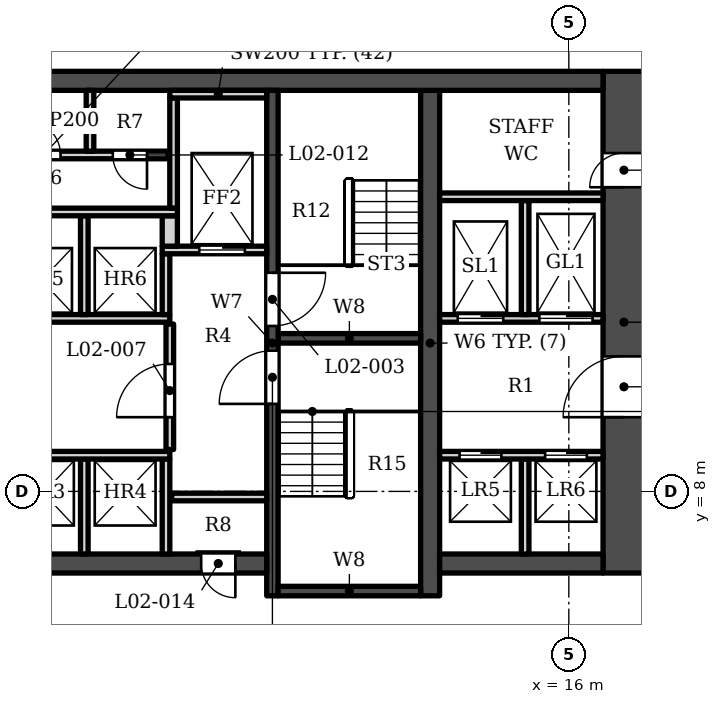
"""IFC4 building model, lengths in metres.
Left out: names, types, materials, properties, quantities, classifications, styles, units other than length and angle.
Written with IfcOpenShell. Run it as: python <this file> out.ifc"""

import sys

from ifc_helpers import new_model, si_unit, direction, frame, frame_2d, origin, place, context, subcontext, project, spatial, rectangle, extrude, element, fill, save


model = new_model("IFC4")
c1 = context("Model", 3, precision=1e-05, world=origin(), true_north=direction((0.0, 1.0)))
c2 = subcontext(c1, "Body", "Model", "MODEL_VIEW")
j1 = project(units=[si_unit("LENGTHUNIT", "METRE"), si_unit("PLANEANGLEUNIT", "RADIAN")], contexts=[c1])
p1 = place(None, origin())
s1 = spatial("IfcSite", under=j1, at=p1, CompositionType="ELEMENT")
p2 = place(p1, origin())
s2 = spatial("IfcBuilding", under=s1, at=p2, CompositionType="ELEMENT")
p3 = place(p2, frame((0.0, 0.0, 20.0)))
s3 = spatial("IfcBuildingStorey", under=s2, at=p3, CompositionType="ELEMENT", Elevation=20.0)
p4 = place(p3, frame((-16.9, 18.802, 0.0), z_axis=(0.0, 0.0, 1.0), x_axis=(1.0, 0.0, 0.0)))
e1 = element("IfcWall", 1, at=p4, inside=s3, PredefinedType="SHEAR", context=c2, shape_type="SweptSolid", body=[
    extrude(rectangle(XDim=33.8, YDim=0.5, at=frame_2d((16.9, 0.0))), origin(), (0.0, 0.0, 1.0), 9.0),
])
p5 = place(p3, frame((12.35, 5.253, 0.0), z_axis=(0.0, 0.0, 1.0), x_axis=(0.0, 1.0, 0.0)))
e2 = element("IfcWall", 2, at=p5, inside=s3, PredefinedType="SHEAR", context=c2, shape_type="SweptSolid", body=[
    extrude(rectangle(XDim=13.3, YDim=0.5, at=frame_2d((6.65, 0.0))), origin(), (0.0, 0.0, 1.0), 9.0),
])
p6 = place(p3, frame((8.2, 5.253, 0.0), z_axis=(0.0, 0.0, 1.0), x_axis=(0.0, 1.0, 0.0)))
e3 = element("IfcWall", 3, at=p6, inside=s3, PredefinedType="SHEAR", context=c2, shape_type="SweptSolid", body=[
    extrude(rectangle(XDim=13.3, YDim=0.3, at=frame_2d((6.65, 0.0))), origin(), (0.0, 0.0, 1.0), 9.0),
])
p7 = place(p6, frame((7.1, 0.0, 0.0)))
e4 = element("IfcOpeningElement", 4, at=p7, cuts=e3, PredefinedType="OPENING", context=c2, shape_type="SweptSolid", body=[
    extrude(rectangle(XDim=1.4, YDim=2.1, at=frame_2d((0.7, 1.05))), frame((0.0, 0.16, 0.0), z_axis=(0.0, -1.0, 0.0), x_axis=(1.0, 0.0, 0.0)), (0.0, 0.0, 1.0), 0.32),
])
p8 = place(p6, frame((5.05, 0.0, 0.0)))
e5 = element("IfcOpeningElement", 5, at=p8, cuts=e3, PredefinedType="OPENING", context=c2, shape_type="SweptSolid", body=[
    extrude(rectangle(XDim=1.4, YDim=2.1, at=frame_2d((0.7, 1.05))), frame((0.0, 0.16, 0.0), z_axis=(0.0, -1.0, 0.0), x_axis=(1.0, 0.0, 0.0)), (0.0, 0.0, 1.0), 0.32),
])
for number, where, z_axis, x_axis in (
    (6, (8.35, 12.028, 0.0), (0.0, 0.0, 1.0), (1.0, 0.0, 0.0)),
    (7, (8.35, 5.378, 0.0), (0.0, 0.0, 1.0), (1.0, 0.0, 0.0)),
):
    element("IfcWall", number, at=place(p3, frame(where, z_axis=z_axis, x_axis=x_axis)), inside=s3, PredefinedType="SHEAR", context=c2, shape_type="SweptSolid", body=[
        extrude(rectangle(XDim=3.75, YDim=0.25, at=frame_2d((1.875, 0.0))), origin(), (0.0, 0.0, 1.0), 9.0),
    ])
p9 = place(p3, frame((1.0, 6.103, 0.0), z_axis=(0.0, 0.0, 1.0), x_axis=(1.0, 0.0, 0.0)))
e8 = element("IfcWall", 8, at=p9, inside=s3, PredefinedType="SHEAR", context=c2, shape_type="SweptSolid", body=[
    extrude(rectangle(XDim=7.05, YDim=0.5, at=frame_2d((3.525, 0.0))), origin(), (0.0, 0.0, 1.0), 9.0),
])
p10 = place(p9, frame((5.325, 0.0, 0.0)))
e9 = element("IfcOpeningElement", 9, at=p10, cuts=e8, PredefinedType="OPENING", context=c2, shape_type="SweptSolid", body=[
    extrude(rectangle(XDim=0.9, YDim=2.1, at=frame_2d((0.45, 1.05))), frame((0.0, 0.26, 0.0), z_axis=(0.0, -1.0, 0.0), x_axis=(1.0, 0.0, 0.0)), (0.0, 0.0, 1.0), 0.52),
])
p11 = place(p3, frame((12.6, 6.103, 0.0), z_axis=(0.0, 0.0, 1.0), x_axis=(1.0, 0.0, 0.0)))
e10 = element("IfcWall", 10, at=p11, inside=s3, PredefinedType="SHEAR", context=c2, shape_type="SweptSolid", body=[
    extrude(rectangle(XDim=4.3, YDim=0.5, at=frame_2d((2.15, 0.0))), origin(), (0.0, 0.0, 1.0), 9.0),
])
p12 = place(p3, frame((17.45, 5.853, 0.0), z_axis=(0.0, 0.0, 1.0), x_axis=(0.0, 1.0, 0.0)))
e11 = element("IfcWall", 11, at=p12, inside=s3, PredefinedType="SHEAR", context=c2, shape_type="SweptSolid", body=[
    extrude(rectangle(XDim=13.2, YDim=1.1, at=frame_2d((6.6, 0.0))), origin(), (0.0, 0.0, 1.0), 9.0),
])
p13 = place(p12, frame((4.1, 0.0, 0.0)))
e12 = element("IfcOpeningElement", 12, at=p13, cuts=e11, PredefinedType="OPENING", context=c2, shape_type="SweptSolid", body=[
    extrude(rectangle(XDim=1.6, YDim=2.1, at=frame_2d((0.8, 1.05))), frame((0.0, 0.56, 0.0), z_axis=(0.0, -1.0, 0.0), x_axis=(1.0, 0.0, 0.0)), (0.0, 0.0, 1.0), 1.12),
])
p14 = place(p12, frame((10.15, 0.0, 0.0)))
e13 = element("IfcOpeningElement", 13, at=p14, cuts=e11, PredefinedType="OPENING", context=c2, shape_type="SweptSolid", body=[
    extrude(rectangle(XDim=0.9, YDim=2.1, at=frame_2d((0.45, 1.05))), frame((0.0, 0.56, 0.0), z_axis=(0.0, -1.0, 0.0), x_axis=(1.0, 0.0, 0.0)), (0.0, 0.0, 1.0), 1.12),
])
for number, where, z_axis, x_axis in (
    (14, (3.25, 6.353, 0.0), (0.0, 0.0, 1.0), (0.0, 1.0, 0.0)),
    (15, (5.4, 6.353, 0.0), (0.0, 0.0, 1.0), (0.0, 1.0, 0.0)),
    (16, (14.85, 6.353, 0.0), (0.0, 0.0, 1.0), (0.0, 1.0, 0.0)),
    (17, (5.55, 7.853, 0.0), (0.0, 0.0, 1.0), (1.0, 0.0, 0.0)),
):
    element("IfcWall", number, at=place(p3, frame(where, z_axis=z_axis, x_axis=x_axis)), inside=s3, PredefinedType="SOLIDWALL", context=c2, shape_type="SweptSolid", body=[
        extrude(rectangle(XDim=2.5, YDim=0.2, at=frame_2d((1.25, 0.0))), origin(), (0.0, 0.0, 1.0), 8.55),
    ])
p15 = place(p3, frame((1.0, 8.953, 0.0), z_axis=(0.0, 0.0, 1.0), x_axis=(1.0, 0.0, 0.0)))
e18 = element("IfcWall", 18, at=p15, inside=s3, PredefinedType="SOLIDWALL", context=c2, shape_type="SweptSolid", body=[
    extrude(rectangle(XDim=4.5, YDim=0.2, at=frame_2d((2.25, 0.0))), origin(), (0.0, 0.0, 1.0), 8.55),
])
p16 = place(p3, frame((12.6, 8.953, 0.0), z_axis=(0.0, 0.0, 1.0), x_axis=(1.0, 0.0, 0.0)))
e19 = element("IfcWall", 19, at=p16, inside=s3, PredefinedType="SOLIDWALL", context=c2, shape_type="SweptSolid", body=[
    extrude(rectangle(XDim=4.3, YDim=0.2, at=frame_2d((2.15, 0.0))), origin(), (0.0, 0.0, 1.0), 8.55),
])
p17 = place(p16, frame((0.525, 0.0, 0.0)))
e20 = element("IfcOpeningElement", 20, at=p17, cuts=e19, PredefinedType="OPENING", context=c2, shape_type="SweptSolid", body=[
    extrude(rectangle(XDim=1.1, YDim=2.1, at=frame_2d((0.55, 1.05))), frame((0.0, 0.11, 0.0), z_axis=(0.0, -1.0, 0.0), x_axis=(1.0, 0.0, 0.0)), (0.0, 0.0, 1.0), 0.22),
])
p18 = place(p16, frame((2.775, 0.0, 0.0)))
e21 = element("IfcOpeningElement", 21, at=p18, cuts=e19, PredefinedType="OPENING", context=c2, shape_type="SweptSolid", body=[
    extrude(rectangle(XDim=1.1, YDim=2.1, at=frame_2d((0.55, 1.05))), frame((0.0, 0.11, 0.0), z_axis=(0.0, -1.0, 0.0), x_axis=(1.0, 0.0, 0.0)), (0.0, 0.0, 1.0), 0.22),
])
p19 = place(p3, frame((5.5, 9.103, 0.0), z_axis=(0.0, 0.0, 1.0), x_axis=(0.0, 1.0, 0.0)))
e22 = element("IfcWall", 22, at=p19, inside=s3, PredefinedType="SOLIDWALL", context=c2, shape_type="SweptSolid", body=[
    extrude(rectangle(XDim=3.3, YDim=0.2, at=frame_2d((1.65, 0.0))), origin(), (0.0, 0.0, 1.0), 8.55),
])
p20 = place(p19, frame((0.85, 0.0, 0.0)))
e23 = element("IfcOpeningElement", 23, at=p20, cuts=e22, PredefinedType="OPENING", context=c2, shape_type="SweptSolid", body=[
    extrude(rectangle(XDim=1.4, YDim=2.1, at=frame_2d((0.7, 1.05))), frame((0.0, 0.11, 0.0), z_axis=(0.0, -1.0, 0.0), x_axis=(1.0, 0.0, 0.0)), (0.0, 0.0, 1.0), 0.22),
])
p21 = place(p3, frame((-1.5, 12.552, 0.0), z_axis=(0.0, 0.0, 1.0), x_axis=(1.0, 0.0, 0.0)))
e24 = element("IfcWall", 24, at=p21, inside=s3, PredefinedType="SOLIDWALL", context=c2, shape_type="SweptSolid", body=[
    extrude(rectangle(XDim=7.0, YDim=0.2, at=frame_2d((3.5, 0.0))), origin(), (0.0, 0.0, 1.0), 8.55),
])
p22 = place(p3, frame((12.6, 12.552, 0.0), z_axis=(0.0, 0.0, 1.0), x_axis=(1.0, 0.0, 0.0)))
e25 = element("IfcWall", 25, at=p22, inside=s3, PredefinedType="SOLIDWALL", context=c2, shape_type="SweptSolid", body=[
    extrude(rectangle(XDim=4.3, YDim=0.2, at=frame_2d((2.15, 0.0))), origin(), (0.0, 0.0, 1.0), 8.55),
])
p23 = place(p22, frame((0.475, 0.0, 0.0)))
e26 = element("IfcOpeningElement", 26, at=p23, cuts=e25, PredefinedType="OPENING", context=c2, shape_type="SweptSolid", body=[
    extrude(rectangle(XDim=1.2, YDim=2.1, at=frame_2d((0.6, 1.05))), frame((0.0, 0.11, 0.0), z_axis=(0.0, -1.0, 0.0), x_axis=(1.0, 0.0, 0.0)), (0.0, 0.0, 1.0), 0.22),
])
p24 = place(p22, frame((2.625, 0.0, 0.0)))
e27 = element("IfcOpeningElement", 27, at=p24, cuts=e25, PredefinedType="OPENING", context=c2, shape_type="SweptSolid", body=[
    extrude(rectangle(XDim=1.4, YDim=2.1, at=frame_2d((0.7, 1.05))), frame((0.0, 0.11, 0.0), z_axis=(0.0, -1.0, 0.0), x_axis=(1.0, 0.0, 0.0)), (0.0, 0.0, 1.0), 0.22),
])
p25 = place(p3, frame((3.25, 12.653, 0.0), z_axis=(0.0, 0.0, 1.0), x_axis=(0.0, 1.0, 0.0)))
e28 = element("IfcWall", 28, at=p25, inside=s3, PredefinedType="SOLIDWALL", context=c2, shape_type="SweptSolid", body=[
    extrude(rectangle(XDim=2.6, YDim=0.2, at=frame_2d((1.3, 0.0))), origin(), (0.0, 0.0, 1.0), 8.55),
])
p26 = place(p3, frame((5.4, 12.653, 0.0), z_axis=(0.0, 0.0, 1.0), x_axis=(0.0, 1.0, 0.0)))
e29 = element("IfcWall", 29, at=p26, inside=s3, PredefinedType="SOLIDWALL", context=c2, shape_type="SweptSolid", body=[
    extrude(rectangle(XDim=1.6, YDim=0.2, at=frame_2d((0.8, 0.0))), origin(), (0.0, 0.0, 1.0), 8.55),
])
p27 = place(p3, frame((14.85, 12.653, 0.0), z_axis=(0.0, 0.0, 1.0), x_axis=(0.0, 1.0, 0.0)))
e30 = element("IfcWall", 30, at=p27, inside=s3, PredefinedType="SOLIDWALL", context=c2, shape_type="SweptSolid", body=[
    extrude(rectangle(XDim=3.0, YDim=0.2, at=frame_2d((1.5, 0.0))), origin(), (0.0, 0.0, 1.0), 8.55),
])
p28 = place(p3, frame((5.3, 14.353, 0.0), z_axis=(0.0, 0.0, 1.0), x_axis=(1.0, 0.0, 0.0)))
e31 = element("IfcWall", 31, at=p28, inside=s3, PredefinedType="SOLIDWALL", context=c2, shape_type="SweptSolid", body=[
    extrude(rectangle(XDim=2.75, YDim=0.2, at=frame_2d((1.375, 0.0))), origin(), (0.0, 0.0, 1.0), 8.55),
])
p29 = place(p28, frame((0.975, 0.0, 0.0)))
e32 = element("IfcOpeningElement", 32, at=p29, cuts=e31, PredefinedType="OPENING", context=c2, shape_type="SweptSolid", body=[
    extrude(rectangle(XDim=1.2, YDim=2.1, at=frame_2d((0.6, 1.05))), frame((0.0, 0.11, 0.0), z_axis=(0.0, -1.0, 0.0), x_axis=(1.0, 0.0, 0.0)), (0.0, 0.0, 1.0), 0.22),
])
p30 = place(p3, frame((5.5, 14.453, 0.0), z_axis=(0.0, 0.0, 1.0), x_axis=(0.0, 1.0, 0.0)))
e33 = element("IfcWall", 33, at=p30, inside=s3, PredefinedType="SOLIDWALL", context=c2, shape_type="SweptSolid", body=[
    extrude(rectangle(XDim=0.8, YDim=0.4, at=frame_2d((0.4, 0.0))), origin(), (0.0, 0.0, 1.0), 8.55),
])
p31 = place(p3, frame((-1.5, 15.353, 0.0), z_axis=(0.0, 0.0, 1.0), x_axis=(1.0, 0.0, 0.0)))
e34 = element("IfcWall", 34, at=p31, inside=s3, PredefinedType="SOLIDWALL", context=c2, shape_type="SweptSolid", body=[
    extrude(rectangle(XDim=7.2, YDim=0.2, at=frame_2d((3.6, 0.0))), origin(), (0.0, 0.0, 1.0), 8.55),
])
p32 = place(p3, frame((5.6, 15.453, 0.0), z_axis=(0.0, 0.0, 1.0), x_axis=(0.0, 1.0, 0.0)))
e35 = element("IfcWall", 35, at=p32, inside=s3, PredefinedType="SOLIDWALL", context=c2, shape_type="SweptSolid", body=[
    extrude(rectangle(XDim=2.9, YDim=0.2, at=frame_2d((1.45, 0.0))), origin(), (0.0, 0.0, 1.0), 8.55),
])
p33 = place(p3, frame((12.6, 15.753, 0.0), z_axis=(0.0, 0.0, 1.0), x_axis=(1.0, 0.0, 0.0)))
e36 = element("IfcWall", 36, at=p33, inside=s3, PredefinedType="SOLIDWALL", context=c2, shape_type="SweptSolid", body=[
    extrude(rectangle(XDim=4.3, YDim=0.2, at=frame_2d((2.15, 0.0))), origin(), (0.0, 0.0, 1.0), 8.55),
])
p34 = place(p3, frame((-1.6, 16.853, 0.0), z_axis=(0.0, 0.0, 1.0), x_axis=(1.0, 0.0, 0.0)))
e37 = element("IfcWall", 37, at=p34, inside=s3, PredefinedType="SOLIDWALL", context=c2, shape_type="SweptSolid", body=[
    extrude(rectangle(XDim=7.05, YDim=0.2, at=frame_2d((3.525, 0.0))), origin(), (0.0, 0.0, 1.0), 8.55),
])
p35 = place(p34, frame((0.875, 0.0, 0.0)))
e38 = element("IfcOpeningElement", 38, at=p35, cuts=e37, PredefinedType="OPENING", context=c2, shape_type="SweptSolid", body=[
    extrude(rectangle(XDim=0.9, YDim=2.1, at=frame_2d((0.45, 1.05))), frame((0.0, 0.11, 0.0), z_axis=(0.0, -1.0, 0.0), x_axis=(1.0, 0.0, 0.0)), (0.0, 0.0, 1.0), 0.22),
])
p36 = place(p34, frame((3.325, 0.0, 0.0)))
e39 = element("IfcOpeningElement", 39, at=p36, cuts=e37, PredefinedType="OPENING", context=c2, shape_type="SweptSolid", body=[
    extrude(rectangle(XDim=0.9, YDim=2.1, at=frame_2d((0.45, 1.05))), frame((0.0, 0.11, 0.0), z_axis=(0.0, -1.0, 0.0), x_axis=(1.0, 0.0, 0.0)), (0.0, 0.0, 1.0), 0.22),
])
p37 = place(p34, frame((5.6, 0.0, 0.0)))
e40 = element("IfcOpeningElement", 40, at=p37, cuts=e37, PredefinedType="OPENING", context=c2, shape_type="SweptSolid", body=[
    extrude(rectangle(XDim=0.9, YDim=2.1, at=frame_2d((0.45, 1.05))), frame((0.0, 0.11, 0.0), z_axis=(0.0, -1.0, 0.0), x_axis=(1.0, 0.0, 0.0)), (0.0, 0.0, 1.0), 0.22),
])
p38 = place(p3, frame((3.4, 16.953, 0.0), z_axis=(0.0, 0.0, 1.0), x_axis=(0.0, 1.0, 0.0)))
e41 = element("IfcWall", 41, at=p38, inside=s3, PredefinedType="PARTITIONING", context=c2, shape_type="SweptSolid", body=[
    extrude(rectangle(XDim=1.6, YDim=0.2, at=frame_2d((0.8, 0.0))), origin(), (0.0, 0.0, 1.0), 8.55),
])
p39 = place(p3, frame((5.5, 18.453, 0.0), z_axis=(0.0, 0.0, 1.0), x_axis=(1.0, 0.0, 0.0)))
e42 = element("IfcWall", 42, at=p39, inside=s3, PredefinedType="SOLIDWALL", context=c2, shape_type="SweptSolid", body=[
    extrude(rectangle(XDim=2.55, YDim=0.2, at=frame_2d((1.275, 0.0))), origin(), (0.0, 0.0, 1.0), 8.55),
])
p40 = place(p29, origin())
e43 = element("IfcDoor", 43, at=p40, inside=s3, OperationType="DOUBLE_DOOR_SLIDING", PredefinedType="DOOR", context=c2, shape_type="SweptSolid", body=[
    extrude(rectangle(XDim=1.2, YDim=2.1, at=frame_2d((0.6, 1.05))), frame((0.0, 0.025, 0.0), z_axis=(0.0, -1.0, 0.0), x_axis=(1.0, 0.0, 0.0)), (0.0, 0.0, 1.0), 0.05),
])
fill(e32, e43)
p41 = place(p17, origin())
e44 = element("IfcDoor", 44, at=p41, inside=s3, OperationType="DOUBLE_DOOR_SLIDING", PredefinedType="DOOR", context=c2, shape_type="SweptSolid", body=[
    extrude(rectangle(XDim=1.1, YDim=2.1, at=frame_2d((0.55, 1.05))), frame((0.0, 0.025, 0.0), z_axis=(0.0, -1.0, 0.0), x_axis=(1.0, 0.0, 0.0)), (0.0, 0.0, 1.0), 0.05),
])
fill(e20, e44)
p42 = place(p18, origin())
e45 = element("IfcDoor", 45, at=p42, inside=s3, OperationType="DOUBLE_DOOR_SLIDING", PredefinedType="DOOR", context=c2, shape_type="SweptSolid", body=[
    extrude(rectangle(XDim=1.1, YDim=2.1, at=frame_2d((0.55, 1.05))), frame((0.0, 0.025, 0.0), z_axis=(0.0, -1.0, 0.0), x_axis=(1.0, 0.0, 0.0)), (0.0, 0.0, 1.0), 0.05),
])
fill(e21, e45)
p43 = place(p23, origin())
e46 = element("IfcDoor", 46, at=p43, inside=s3, OperationType="DOUBLE_DOOR_SLIDING", PredefinedType="DOOR", context=c2, shape_type="SweptSolid", body=[
    extrude(rectangle(XDim=1.2, YDim=2.1, at=frame_2d((0.6, 1.05))), frame((0.0, 0.025, 0.0), z_axis=(0.0, -1.0, 0.0), x_axis=(1.0, 0.0, 0.0)), (0.0, 0.0, 1.0), 0.05),
])
fill(e26, e46)
p44 = place(p24, origin())
e47 = element("IfcDoor", 47, at=p44, inside=s3, OperationType="DOUBLE_DOOR_SLIDING", PredefinedType="DOOR", context=c2, shape_type="SweptSolid", body=[
    extrude(rectangle(XDim=1.4, YDim=2.1, at=frame_2d((0.7, 1.05))), frame((0.0, 0.025, 0.0), z_axis=(0.0, -1.0, 0.0), x_axis=(1.0, 0.0, 0.0)), (0.0, 0.0, 1.0), 0.05),
])
fill(e27, e47)
p45 = place(p7, origin())
e48 = element("IfcDoor", 48, at=p45, inside=s3, OperationType="SINGLE_SWING_RIGHT", PredefinedType="DOOR", context=c2, shape_type="SweptSolid", body=[
    extrude(rectangle(XDim=1.4, YDim=2.1, at=frame_2d((0.7, 1.05))), frame((0.0, 0.025, 0.0), z_axis=(0.0, -1.0, 0.0), x_axis=(1.0, 0.0, 0.0)), (0.0, 0.0, 1.0), 0.05),
])
fill(e4, e48)
p46 = place(p8, origin())
e49 = element("IfcDoor", 49, at=p46, inside=s3, OperationType="SINGLE_SWING_LEFT", PredefinedType="DOOR", context=c2, shape_type="SweptSolid", body=[
    extrude(rectangle(XDim=1.4, YDim=2.1, at=frame_2d((0.7, 1.05))), frame((0.0, 0.025, 0.0), z_axis=(0.0, -1.0, 0.0), x_axis=(1.0, 0.0, 0.0)), (0.0, 0.0, 1.0), 0.05),
])
fill(e5, e49)
p47 = place(p20, origin())
e50 = element("IfcDoor", 50, at=p47, inside=s3, OperationType="SINGLE_SWING_LEFT", PredefinedType="DOOR", context=c2, shape_type="SweptSolid", body=[
    extrude(rectangle(XDim=1.4, YDim=2.1, at=frame_2d((0.7, 1.05))), frame((0.0, 0.025, 0.0), z_axis=(0.0, -1.0, 0.0), x_axis=(1.0, 0.0, 0.0)), (0.0, 0.0, 1.0), 0.05),
])
fill(e23, e50)
p48 = place(p36, origin())
e51 = element("IfcDoor", 51, at=p48, inside=s3, OperationType="SINGLE_SWING_LEFT", PredefinedType="DOOR", context=c2, shape_type="SweptSolid", body=[
    extrude(rectangle(XDim=0.9, YDim=2.1, at=frame_2d((0.45, 1.05))), frame((0.0, 0.025, 0.0), z_axis=(0.0, -1.0, 0.0), x_axis=(1.0, 0.0, 0.0)), (0.0, 0.0, 1.0), 0.05),
])
fill(e39, e51)
p49 = place(p37, origin())
e52 = element("IfcDoor", 52, at=p49, inside=s3, OperationType="SINGLE_SWING_RIGHT", PredefinedType="DOOR", context=c2, shape_type="SweptSolid", body=[
    extrude(rectangle(XDim=0.9, YDim=2.1, at=frame_2d((0.45, 1.05))), frame((0.0, 0.025, 0.0), z_axis=(0.0, -1.0, 0.0), x_axis=(1.0, 0.0, 0.0)), (0.0, 0.0, 1.0), 0.05),
])
fill(e40, e52)
p50 = place(p10, origin())
e53 = element("IfcDoor", 53, at=p50, inside=s3, OperationType="SINGLE_SWING_RIGHT", PredefinedType="DOOR", context=c2, shape_type="SweptSolid", body=[
    extrude(rectangle(XDim=0.9, YDim=2.1, at=frame_2d((0.45, 1.05))), frame((0.0, 0.025, 0.0), z_axis=(0.0, -1.0, 0.0), x_axis=(1.0, 0.0, 0.0)), (0.0, 0.0, 1.0), 0.05),
])
fill(e9, e53)
p51 = place(p13, origin())
e54 = element("IfcDoor", 54, at=p51, inside=s3, OperationType="DOUBLE_DOOR_SINGLE_SWING", PredefinedType="DOOR", context=c2, shape_type="SweptSolid", body=[
    extrude(rectangle(XDim=1.6, YDim=2.1, at=frame_2d((0.8, 1.05))), frame((0.0, 0.275, 0.0), z_axis=(0.0, -1.0, 0.0), x_axis=(1.0, 0.0, 0.0)), (0.0, 0.0, 1.0), 0.05),
])
fill(e12, e54)
p52 = place(p14, origin())
e55 = element("IfcDoor", 55, at=p52, inside=s3, OperationType="SINGLE_SWING_LEFT", PredefinedType="DOOR", context=c2, shape_type="SweptSolid", body=[
    extrude(rectangle(XDim=0.9, YDim=2.1, at=frame_2d((0.45, 1.05))), frame((0.0, 0.275, 0.0), z_axis=(0.0, -1.0, 0.0), x_axis=(1.0, 0.0, 0.0)), (0.0, 0.0, 1.0), 0.05),
])
fill(e13, e55)
save(model, sys.argv[1])
